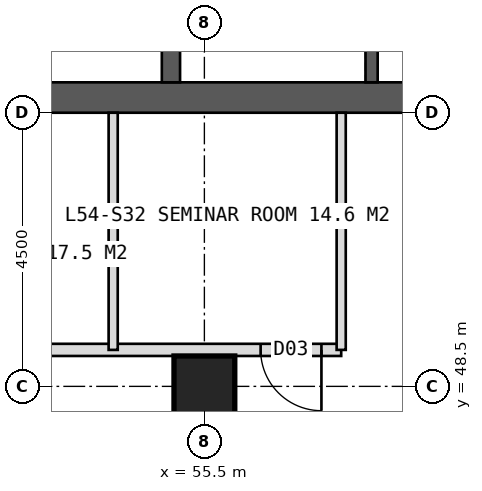
"""IFC4 building model, lengths in metres.
Left out: names, types, materials, properties, quantities, classifications, styles, units other than length and angle.
Written with IfcOpenShell. Run it as: python <this file> out.ifc"""

import sys

from ifc_helpers import new_model, si_unit, direction, frame, frame_2d, origin, origin_2d, place, context, subcontext, project, spatial, rectangle, hollow_rectangle, extrude, element, fill, save


model = new_model("IFC4")
c1 = context("Model", 3, precision=1e-05, world=origin(), true_north=direction((0.0, 1.0)))
c2 = subcontext(c1, "Body", "Model", "MODEL_VIEW")
j1 = project(units=[si_unit("LENGTHUNIT", "METRE"), si_unit("PLANEANGLEUNIT", "RADIAN")], contexts=[c1])
p1 = place(None, origin())
s1 = spatial("IfcSite", under=j1, at=p1, CompositionType="ELEMENT")
p2 = place(p1, origin())
s2 = spatial("IfcBuilding", under=s1, at=p2, CompositionType="ELEMENT")
p3 = place(p2, frame((0.0, 0.0, 225.0)))
s3 = spatial("IfcBuildingStorey", under=s2, at=p3, CompositionType="ELEMENT", Elevation=225.0)
p4 = place(p3, frame((51.0, 53.25, 0.0), z_axis=(0.0, 0.0, 1.0), x_axis=(1.0, 0.0, 0.0)))
e1 = element("IfcWall", 1, at=p4, inside=s3, PredefinedType="SHEAR", context=c2, shape_type="SweptSolid", body=[
    extrude(rectangle(XDim=18.0, YDim=0.5, at=frame_2d((9.0, 0.0))), origin(), (0.0, 0.0, 1.0), 4.0),
])
p5 = place(p4, frame((8.1, 0.0, 0.0)))
e2 = element("IfcOpeningElement", 2, at=p5, cuts=e1, PredefinedType="OPENING", context=c2, shape_type="SweptSolid", body=[
    extrude(rectangle(XDim=1.8, YDim=2.2, at=frame_2d((0.9, 1.1))), frame((0.0, 0.26, 0.0), z_axis=(0.0, -1.0, 0.0), x_axis=(1.0, 0.0, 0.0)), (0.0, 0.0, 1.0), 0.52),
])
p6 = place(p3, frame((54.95, 53.5, 0.0), z_axis=(0.0, 0.0, 1.0), x_axis=(0.0, 1.0, 0.0)))
e3 = element("IfcWall", 3, at=p6, inside=s3, PredefinedType="SHEAR", context=c2, shape_type="SweptSolid", body=[
    extrude(rectangle(XDim=17.0, YDim=0.3, at=frame_2d((8.5, 0.0))), origin(), (0.0, 0.0, 1.0), 4.0),
])
p7 = place(p3, frame((58.25, 53.5, 0.0), z_axis=(0.0, 0.0, 1.0), x_axis=(0.0, 1.0, 0.0)))
e4 = element("IfcWall", 4, at=p7, inside=s3, PredefinedType="SHEAR", context=c2, shape_type="SweptSolid", body=[
    extrude(rectangle(XDim=17.0, YDim=0.2, at=frame_2d((8.5, 0.0))), origin(), (0.0, 0.0, 1.0), 4.0),
])
p8 = place(p7, frame((0.6, 0.0, 0.0)))
e5 = element("IfcOpeningElement", 5, at=p8, cuts=e4, PredefinedType="OPENING", context=c2, shape_type="SweptSolid", body=[
    extrude(rectangle(XDim=1.0, YDim=2.1, at=frame_2d((0.5, 1.05))), frame((0.0, 0.11, 0.0), z_axis=(0.0, -1.0, 0.0), x_axis=(1.0, 0.0, 0.0)), (0.0, 0.0, 1.0), 0.22),
])
p9 = place(p7, frame((2.75, 0.0, 0.0)))
e6 = element("IfcOpeningElement", 6, at=p9, cuts=e4, PredefinedType="OPENING", context=c2, shape_type="SweptSolid", body=[
    extrude(rectangle(XDim=1.0, YDim=2.1, at=frame_2d((0.5, 1.05))), frame((0.0, 0.11, 0.0), z_axis=(0.0, -1.0, 0.0), x_axis=(1.0, 0.0, 0.0)), (0.0, 0.0, 1.0), 0.22),
])
p10 = place(p7, frame((4.824, 0.0, 0.0)))
e7 = element("IfcOpeningElement", 7, at=p10, cuts=e4, PredefinedType="OPENING", context=c2, shape_type="SweptSolid", body=[
    extrude(rectangle(XDim=1.0, YDim=2.1, at=frame_2d((0.5, 1.05))), frame((0.0, 0.11, 0.0), z_axis=(0.0, -1.0, 0.0), x_axis=(1.0, 0.0, 0.0)), (0.0, 0.0, 1.0), 0.22),
])
p11 = place(p7, frame((6.924, 0.0, 0.0)))
e8 = element("IfcOpeningElement", 8, at=p11, cuts=e4, PredefinedType="OPENING", context=c2, shape_type="SweptSolid", body=[
    extrude(rectangle(XDim=1.0, YDim=2.1, at=frame_2d((0.5, 1.05))), frame((0.0, 0.11, 0.0), z_axis=(0.0, -1.0, 0.0), x_axis=(1.0, 0.0, 0.0)), (0.0, 0.0, 1.0), 0.22),
])
p12 = place(p7, frame((10.025, 0.0, 0.0)))
e9 = element("IfcOpeningElement", 9, at=p12, cuts=e4, PredefinedType="OPENING", context=c2, shape_type="SweptSolid", body=[
    extrude(rectangle(XDim=1.4, YDim=2.2, at=frame_2d((0.7, 1.1))), frame((0.0, 0.11, 0.0), z_axis=(0.0, -1.0, 0.0), x_axis=(1.0, 0.0, 0.0)), (0.0, 0.0, 1.0), 0.22),
])
p13 = place(p7, frame((14.325, 0.0, 0.0)))
e10 = element("IfcOpeningElement", 10, at=p13, cuts=e4, PredefinedType="OPENING", context=c2, shape_type="SweptSolid", body=[
    extrude(rectangle(XDim=1.4, YDim=2.2, at=frame_2d((0.7, 1.1))), frame((0.0, 0.11, 0.0), z_axis=(0.0, -1.0, 0.0), x_axis=(1.0, 0.0, 0.0)), (0.0, 0.0, 1.0), 0.22),
])
p14 = place(p3, frame((55.5, 48.5, 0.0), z_axis=(0.0, 0.0, 1.0), x_axis=(1.0, 0.0, 0.0)))
e11 = element("IfcColumn", 11, at=p14, inside=s3, PredefinedType="COLUMN", context=c2, shape_type="SweptSolid", body=[
    extrude(hollow_rectangle(XDim=1.0, YDim=1.0, WallThickness=0.1, at=origin_2d()), origin(), (0.0, 0.0, 1.0), 4.0),
])
p15 = place(p3, frame((57.75, 49.1, 0.0), z_axis=(0.0, 0.0, 1.0), x_axis=(-1.0, 0.0, 0.0)))
e12 = element("IfcWall", 12, at=p15, inside=s3, PredefinedType="PARTITIONING", context=c2, shape_type="SweptSolid", body=[
    extrude(rectangle(XDim=12.15, YDim=0.2, at=frame_2d((6.075, 0.0))), origin(), (0.0, 0.0, 1.0), 3.75),
])
p16 = place(p15, frame((0.325, 0.0, 0.0)))
e13 = element("IfcOpeningElement", 13, at=p16, cuts=e12, PredefinedType="OPENING", context=c2, shape_type="SweptSolid", body=[
    extrude(rectangle(XDim=1.0, YDim=2.1, at=frame_2d((0.5, 1.05))), frame((0.0, 0.11, 0.0), z_axis=(0.0, -1.0, 0.0), x_axis=(1.0, 0.0, 0.0)), (0.0, 0.0, 1.0), 0.22),
])
p17 = place(p15, frame((5.5, 0.0, 0.0)))
e14 = element("IfcOpeningElement", 14, at=p17, cuts=e12, PredefinedType="OPENING", context=c2, shape_type="SweptSolid", body=[
    extrude(rectangle(XDim=1.0, YDim=2.1, at=frame_2d((0.5, 1.05))), frame((0.0, 0.11, 0.0), z_axis=(0.0, -1.0, 0.0), x_axis=(1.0, 0.0, 0.0)), (0.0, 0.0, 1.0), 0.22),
])
p18 = place(p15, frame((8.95, 0.0, 0.0)))
e15 = element("IfcOpeningElement", 15, at=p18, cuts=e12, PredefinedType="OPENING", context=c2, shape_type="SweptSolid", body=[
    extrude(rectangle(XDim=1.0, YDim=2.1, at=frame_2d((0.5, 1.05))), frame((0.0, 0.11, 0.0), z_axis=(0.0, -1.0, 0.0), x_axis=(1.0, 0.0, 0.0)), (0.0, 0.0, 1.0), 0.22),
])
for number, where, z_axis, x_axis in (
    (16, (57.75, 53.0, 0.0), (0.0, 0.0, 1.0), (0.0, -1.0, 0.0)),
    (17, (54.0, 53.0, 0.0), (0.0, 0.0, 1.0), (0.0, -1.0, 0.0)),
):
    element("IfcWall", number, at=place(p3, frame(where, z_axis=z_axis, x_axis=x_axis)), inside=s3, PredefinedType="PARTITIONING", context=c2, shape_type="SweptSolid", body=[
        extrude(rectangle(XDim=3.9, YDim=0.15, at=frame_2d((1.95, 0.0))), origin(), (0.0, 0.0, 1.0), 3.75),
    ])
p19 = place(p16, origin())
e18 = element("IfcDoor", 18, at=p19, inside=s3, OperationType="SINGLE_SWING_LEFT", PredefinedType="DOOR", context=c2, shape_type="SweptSolid", body=[
    extrude(rectangle(XDim=1.0, YDim=2.1, at=frame_2d((0.5, 1.05))), frame((0.0, 0.025, 0.0), z_axis=(0.0, -1.0, 0.0), x_axis=(1.0, 0.0, 0.0)), (0.0, 0.0, 1.0), 0.05),
])
fill(e13, e18)
save(model, sys.argv[1])
